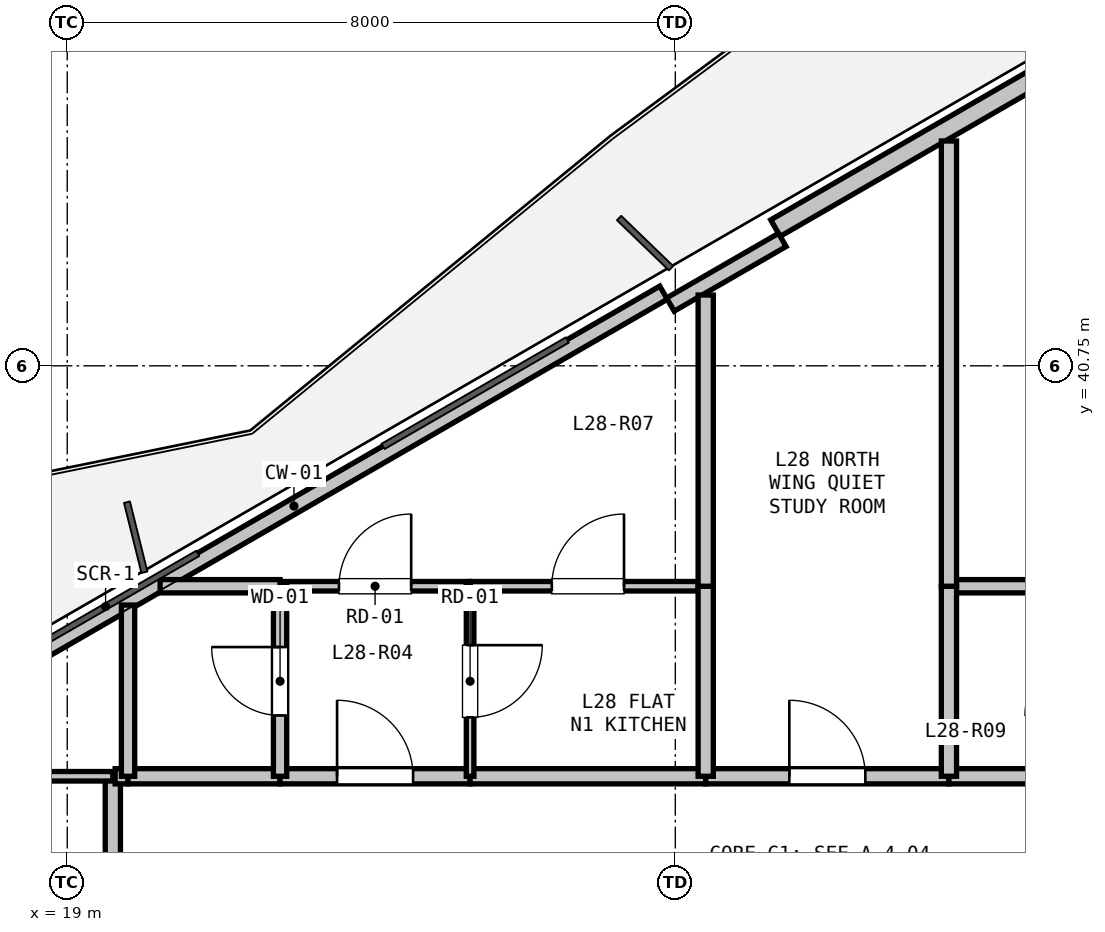
"""IFC4 building model, lengths in metres.
Left out: names, types, materials, properties, quantities, classifications, styles, units other than length and angle.
Written with IfcOpenShell. Run it as: python <this file> out.ifc"""

import sys

from ifc_helpers import new_model, si_unit, direction, frame, frame_2d, origin, place, context, subcontext, project, spatial, rectangle, extrude, element, fill, save


model = new_model("IFC4")
c1 = context("Model", 3, precision=1e-05, world=origin(), true_north=direction((0.0, 1.0)))
c2 = subcontext(c1, "Body", "Model", "MODEL_VIEW")
j1 = project(units=[si_unit("LENGTHUNIT", "METRE"), si_unit("PLANEANGLEUNIT", "RADIAN")], contexts=[c1])
p1 = place(None, origin())
s1 = spatial("IfcSite", under=j1, at=p1, CompositionType="ELEMENT")
p2 = place(p1, origin())
s2 = spatial("IfcBuilding", under=s1, at=p2, CompositionType="ELEMENT")
p3 = place(p2, frame((0.0, 0.0, 103.2)))
s3 = spatial("IfcBuildingStorey", under=s2, at=p3, CompositionType="ELEMENT", Elevation=103.2)
p4 = place(p3, frame((17.12, 36.097, 0.0), z_axis=(0.0, 0.0, 1.0), x_axis=(0.866027010039, 0.499997217876, 0.0)))
e1 = element("IfcWall", 1, at=p4, inside=s3, PredefinedType="PARAPET", context=c2, shape_type="SweptSolid", body=[
    extrude(rectangle(XDim=11.229, YDim=0.2, at=frame_2d((5.615, 0.0))), origin(), (0.0, 0.0, 1.0), 0.2),
])
p5 = place(p3, frame((28.317, 42.562, 0.0), z_axis=(0.0, 0.0, 1.0), x_axis=(0.866023023012, 0.500004123596, 0.0)))
e2 = element("IfcWall", 2, at=p5, inside=s3, PredefinedType="SOLIDWALL", context=c2, shape_type="SweptSolid", body=[
    extrude(rectangle(XDim=11.93, YDim=0.25, at=frame_2d((5.965, 0.0))), origin(), (0.0, 0.0, 1.0), 2.67),
])
p6 = place(p5, frame((6.718, 0.0, 0.9)))
e3 = element("IfcOpeningElement", 3, at=p6, cuts=e2, PredefinedType="OPENING", context=c2, shape_type="SweptSolid", body=[
    extrude(rectangle(XDim=1.2, YDim=1.4, at=frame_2d((0.6, 0.7))), frame((0.0, 0.135, 0.0), z_axis=(0.0, -1.0, 0.0), x_axis=(1.0, 0.0, 0.0)), (0.0, 0.0, 1.0), 0.27),
])
p7 = place(p3, frame((26.935, 41.556, 0.0), z_axis=(0.0, 0.0, 1.0), x_axis=(0.86605165483, 0.499954529098, 0.0)))
e4 = element("IfcWall", 4, at=p7, inside=s3, PredefinedType="PARAPET", context=c2, shape_type="SweptSolid", body=[
    extrude(rectangle(XDim=1.7, YDim=0.2, at=frame_2d((0.85, 0.0))), origin(), (0.0, 0.0, 1.0), 2.67),
])
p8 = place(p3, frame((19.6, 31.45, 0.0), z_axis=(0.0, 0.0, 1.0), x_axis=(0.0, 1.0, 0.0)))
e5 = element("IfcWall", 5, at=p8, inside=s3, PredefinedType="PARTITIONING", context=c2, shape_type="SweptSolid", body=[
    extrude(rectangle(XDim=3.9, YDim=0.2, at=frame_2d((1.95, 0.0))), origin(), (0.0, 0.0, 1.0), 2.423),
])
p9 = place(p3, frame((19.63, 35.35, 0.0), z_axis=(0.0, 0.0, 1.0), x_axis=(1.0, 0.0, 0.0)))
e6 = element("IfcWall", 6, at=p9, inside=s3, PredefinedType="PARTITIONING", context=c2, shape_type="SweptSolid", body=[
    extrude(rectangle(XDim=0.17, YDim=0.2, at=frame_2d((0.085, 0.0))), origin(), (0.0, 0.0, 1.0), 3.05),
])
p10 = place(p3, frame((19.8, 35.35, 0.0), z_axis=(0.0, 0.0, 1.0), x_axis=(1.0, 0.0, 0.0)))
e7 = element("IfcWall", 7, at=p10, inside=s3, PredefinedType="PARTITIONING", context=c2, shape_type="SweptSolid", body=[
    extrude(rectangle(XDim=2.0, YDim=0.2, at=frame_2d((1.0, 0.0))), origin(), (0.0, 0.0, 1.0), 3.05),
])
p11 = place(p3, frame((21.8, 35.35, 0.0), z_axis=(0.0, 0.0, 1.0), x_axis=(1.0, 0.0, 0.0)))
e8 = element("IfcWall", 8, at=p11, inside=s3, PredefinedType="PARTITIONING", context=c2, shape_type="SweptSolid", body=[
    extrude(rectangle(XDim=2.5, YDim=0.2, at=frame_2d((1.25, 0.0))), origin(), (0.0, 0.0, 1.0), 3.05),
])
p12 = place(p11, frame((0.75, 0.0, 0.0)))
e9 = element("IfcOpeningElement", 9, at=p12, cuts=e8, PredefinedType="OPENING", context=c2, shape_type="SweptSolid", body=[
    extrude(rectangle(XDim=1.0, YDim=2.15, at=frame_2d((0.5, 1.075))), frame((0.0, 0.11, 0.0), z_axis=(0.0, -1.0, 0.0), x_axis=(1.0, 0.0, 0.0)), (0.0, 0.0, 1.0), 0.22),
])
p13 = place(p3, frame((24.3, 35.35, 0.0), z_axis=(0.0, 0.0, 1.0), x_axis=(1.0, 0.0, 0.0)))
e10 = element("IfcWall", 10, at=p13, inside=s3, PredefinedType="PARTITIONING", context=c2, shape_type="SweptSolid", body=[
    extrude(rectangle(XDim=3.1, YDim=0.2, at=frame_2d((1.55, 0.0))), origin(), (0.0, 0.0, 1.0), 3.05),
])
p14 = place(p3, frame((27.4, 35.35, 0.0), z_axis=(0.0, 0.0, 1.0), x_axis=(1.0, 0.0, 0.0)))
e11 = element("IfcWall", 11, at=p14, inside=s3, PredefinedType="PARTITIONING", context=c2, shape_type="SweptSolid", body=[
    extrude(rectangle(XDim=3.2, YDim=0.2, at=frame_2d((1.6, 0.0))), origin(), (0.0, 0.0, 1.0), 3.05),
])
p15 = place(p14, frame((1.1, 0.0, 0.0)))
e12 = element("IfcOpeningElement", 12, at=p15, cuts=e11, PredefinedType="OPENING", context=c2, shape_type="SweptSolid", body=[
    extrude(rectangle(XDim=1.0, YDim=2.15, at=frame_2d((0.5, 1.075))), frame((0.0, 0.11, 0.0), z_axis=(0.0, -1.0, 0.0), x_axis=(1.0, 0.0, 0.0)), (0.0, 0.0, 1.0), 0.22),
])
p16 = place(p3, frame((30.6, 35.35, 0.0), z_axis=(0.0, 0.0, 1.0), x_axis=(1.0, 0.0, 0.0)))
e13 = element("IfcWall", 13, at=p16, inside=s3, PredefinedType="PARTITIONING", context=c2, shape_type="SweptSolid", body=[
    extrude(rectangle(XDim=1.9, YDim=0.2, at=frame_2d((0.95, 0.0))), origin(), (0.0, 0.0, 1.0), 3.05),
])
p17 = place(p3, frame((21.8, 37.85, 0.0), z_axis=(0.0, 0.0, 1.0), x_axis=(1.0, 0.0, 0.0)))
e14 = element("IfcWall", 14, at=p17, inside=s3, PredefinedType="PARTITIONING", context=c2, shape_type="SweptSolid", body=[
    extrude(rectangle(XDim=2.5, YDim=0.125, at=frame_2d((1.25, 0.0))), origin(), (0.0, 0.0, 1.0), 3.05),
])
p18 = place(p17, frame((0.775, 0.0, 0.0)))
e15 = element("IfcOpeningElement", 15, at=p18, cuts=e14, PredefinedType="OPENING", context=c2, shape_type="SweptSolid", body=[
    extrude(rectangle(XDim=0.95, YDim=2.1, at=frame_2d((0.475, 1.05))), frame((0.0, 0.073, 0.0), z_axis=(0.0, -1.0, 0.0), x_axis=(1.0, 0.0, 0.0)), (0.0, 0.0, 1.0), 0.145),
])
p19 = place(p3, frame((24.3, 37.85, 0.0), z_axis=(0.0, 0.0, 1.0), x_axis=(0.0, -1.0, 0.0)))
e16 = element("IfcWall", 16, at=p19, inside=s3, PredefinedType="PARTITIONING", context=c2, shape_type="SweptSolid", body=[
    extrude(rectangle(XDim=2.5, YDim=0.1, at=frame_2d((1.25, 0.0))), origin(), (0.0, 0.0, 1.0), 3.05),
])
p20 = place(p19, frame((0.775, 0.0, 0.0)))
e17 = element("IfcOpeningElement", 17, at=p20, cuts=e16, PredefinedType="OPENING", context=c2, shape_type="SweptSolid", body=[
    extrude(rectangle(XDim=0.95, YDim=2.1, at=frame_2d((0.475, 1.05))), frame((0.0, 0.06, 0.0), z_axis=(0.0, -1.0, 0.0), x_axis=(1.0, 0.0, 0.0)), (0.0, 0.0, 1.0), 0.12),
])
p21 = place(p3, frame((21.8, 35.35, 0.0), z_axis=(0.0, 0.0, 1.0), x_axis=(0.0, 1.0, 0.0)))
e18 = element("IfcWall", 18, at=p21, inside=s3, PredefinedType="PLUMBINGWALL", context=c2, shape_type="SweptSolid", body=[
    extrude(rectangle(XDim=2.5, YDim=0.175, at=frame_2d((1.25, 0.0))), origin(), (0.0, 0.0, 1.0), 3.05),
])
p22 = place(p21, frame((0.8, 0.0, 0.0)))
e19 = element("IfcOpeningElement", 19, at=p22, cuts=e18, PredefinedType="OPENING", context=c2, shape_type="SweptSolid", body=[
    extrude(rectangle(XDim=0.9, YDim=2.1, at=frame_2d((0.45, 1.05))), frame((0.0, 0.097, 0.0), z_axis=(0.0, -1.0, 0.0), x_axis=(1.0, 0.0, 0.0)), (0.0, 0.0, 1.0), 0.195),
])
p23 = place(p3, frame((19.8, 35.35, 0.0), z_axis=(0.0, 0.0, 1.0), x_axis=(0.0, 1.0, 0.0)))
e20 = element("IfcWall", 20, at=p23, inside=s3, PredefinedType="PLUMBINGWALL", context=c2, shape_type="SweptSolid", body=[
    extrude(rectangle(XDim=2.252, YDim=0.175, at=frame_2d((1.126, 0.0))), origin(), (0.0, 0.0, 1.0), 2.365),
])
p24 = place(p3, frame((20.222, 37.85, 0.0), z_axis=(0.0, 0.0, 1.0), x_axis=(1.0, 0.0, 0.0)))
e21 = element("IfcWall", 21, at=p24, inside=s3, PredefinedType="PLUMBINGWALL", context=c2, shape_type="SweptSolid", body=[
    extrude(rectangle(XDim=1.578, YDim=0.175, at=frame_2d((0.789, 0.0))), origin(), (0.0, 0.0, 1.0), 2.365),
])
p25 = place(p3, frame((24.3, 37.85, 0.0), z_axis=(0.0, 0.0, 1.0), x_axis=(1.0, 0.0, 0.0)))
e22 = element("IfcWall", 22, at=p25, inside=s3, PredefinedType="PARTITIONING", context=c2, shape_type="SweptSolid", body=[
    extrude(rectangle(XDim=3.1, YDim=0.125, at=frame_2d((1.55, 0.0))), origin(), (0.0, 0.0, 1.0), 3.05),
])
p26 = place(p25, frame((1.075, 0.0, 0.0)))
e23 = element("IfcOpeningElement", 23, at=p26, cuts=e22, PredefinedType="OPENING", context=c2, shape_type="SweptSolid", body=[
    extrude(rectangle(XDim=0.95, YDim=2.1, at=frame_2d((0.475, 1.05))), frame((0.0, 0.073, 0.0), z_axis=(0.0, -1.0, 0.0), x_axis=(1.0, 0.0, 0.0)), (0.0, 0.0, 1.0), 0.145),
])
p27 = place(p3, frame((27.4, 37.85, 0.0), z_axis=(0.0, 0.0, 1.0), x_axis=(0.0, -1.0, 0.0)))
e24 = element("IfcWall", 24, at=p27, inside=s3, PredefinedType="PARTITIONING", context=c2, shape_type="SweptSolid", body=[
    extrude(rectangle(XDim=2.5, YDim=0.2, at=frame_2d((1.25, 0.0))), origin(), (0.0, 0.0, 1.0), 3.05),
])
p28 = place(p3, frame((30.6, 37.85, 0.0), z_axis=(0.0, 0.0, 1.0), x_axis=(1.0, 0.0, 0.0)))
e25 = element("IfcWall", 25, at=p28, inside=s3, PredefinedType="PLUMBINGWALL", context=c2, shape_type="SweptSolid", body=[
    extrude(rectangle(XDim=1.9, YDim=0.175, at=frame_2d((0.95, 0.0))), origin(), (0.0, 0.0, 1.0), 3.05),
])
p29 = place(p3, frame((30.6, 35.35, 0.0), z_axis=(0.0, 0.0, 1.0), x_axis=(0.0, 1.0, 0.0)))
e26 = element("IfcWall", 26, at=p29, inside=s3, PredefinedType="PARTITIONING", context=c2, shape_type="SweptSolid", body=[
    extrude(rectangle(XDim=2.5, YDim=0.2, at=frame_2d((1.25, 0.0))), origin(), (0.0, 0.0, 1.0), 3.05),
])
p30 = place(p3, frame((17.15, 35.35, 0.0), z_axis=(0.0, 0.0, 1.0), x_axis=(1.0, 0.0, 0.0)))
e27 = element("IfcWall", 27, at=p30, inside=s3, PredefinedType="PARTITIONING", context=c2, shape_type="SweptSolid", body=[
    extrude(rectangle(XDim=2.45, YDim=0.125, at=frame_2d((1.225, 0.0))), origin(), (0.0, 0.0, 1.0), 2.365),
])
p31 = place(p3, frame((30.6, 43.708, 0.0), z_axis=(0.0, 0.0, 1.0), x_axis=(0.0, -1.0, 0.0)))
e28 = element("IfcWall", 28, at=p31, inside=s3, PredefinedType="PARTITIONING", context=c2, shape_type="SweptSolid", body=[
    extrude(rectangle(XDim=5.857, YDim=0.2, at=frame_2d((2.929, 0.0))), origin(), (0.0, 0.0, 1.0), 2.365),
])
p32 = place(p3, frame((27.4, 37.85, 0.0), z_axis=(0.0, 0.0, 1.0), x_axis=(0.0, 1.0, 0.0)))
e29 = element("IfcWall", 29, at=p32, inside=s3, PredefinedType="PARTITIONING", context=c2, shape_type="SweptSolid", body=[
    extrude(rectangle(XDim=3.831, YDim=0.2, at=frame_2d((1.916, 0.0))), origin(), (0.0, 0.0, 1.0), 2.365),
])
p33 = place(p12, origin())
e30 = element("IfcDoor", 30, at=p33, inside=s3, OperationType="SINGLE_SWING_LEFT", PredefinedType="DOOR", context=c2, shape_type="SweptSolid", body=[
    extrude(rectangle(XDim=1.0, YDim=2.15, at=frame_2d((0.5, 1.075))), frame((0.0, 0.025, 0.0), z_axis=(0.0, -1.0, 0.0), x_axis=(1.0, 0.0, 0.0)), (0.0, 0.0, 1.0), 0.05),
])
fill(e9, e30)
p34 = place(p15, origin())
e31 = element("IfcDoor", 31, at=p34, inside=s3, OperationType="SINGLE_SWING_LEFT", PredefinedType="DOOR", context=c2, shape_type="SweptSolid", body=[
    extrude(rectangle(XDim=1.0, YDim=2.15, at=frame_2d((0.5, 1.075))), frame((0.0, 0.025, 0.0), z_axis=(0.0, -1.0, 0.0), x_axis=(1.0, 0.0, 0.0)), (0.0, 0.0, 1.0), 0.05),
])
fill(e12, e31)
p35 = place(p22, origin())
e32 = element("IfcDoor", 32, at=p35, inside=s3, OperationType="SINGLE_SWING_RIGHT", PredefinedType="DOOR", context=c2, shape_type="SweptSolid", body=[
    extrude(rectangle(XDim=0.9, YDim=2.1, at=frame_2d((0.45, 1.05))), frame((0.0, 0.025, 0.0), z_axis=(0.0, -1.0, 0.0), x_axis=(1.0, 0.0, 0.0)), (0.0, 0.0, 1.0), 0.05),
])
fill(e19, e32)
p36 = place(p20, origin())
e33 = element("IfcDoor", 33, at=p36, inside=s3, OperationType="SINGLE_SWING_LEFT", PredefinedType="DOOR", context=c2, shape_type="SweptSolid", body=[
    extrude(rectangle(XDim=0.95, YDim=2.1, at=frame_2d((0.475, 1.05))), frame((0.0, 0.025, 0.0), z_axis=(0.0, -1.0, 0.0), x_axis=(1.0, 0.0, 0.0)), (0.0, 0.0, 1.0), 0.05),
])
fill(e17, e33)
p37 = place(p18, origin())
e34 = element("IfcDoor", 34, at=p37, inside=s3, OperationType="SINGLE_SWING_RIGHT", PredefinedType="DOOR", context=c2, shape_type="SweptSolid", body=[
    extrude(rectangle(XDim=0.95, YDim=2.1, at=frame_2d((0.475, 1.05))), frame((0.0, 0.025, 0.0), z_axis=(0.0, -1.0, 0.0), x_axis=(1.0, 0.0, 0.0)), (0.0, 0.0, 1.0), 0.05),
])
fill(e15, e34)
p38 = place(p26, origin())
e35 = element("IfcDoor", 35, at=p38, inside=s3, OperationType="SINGLE_SWING_RIGHT", PredefinedType="DOOR", context=c2, shape_type="SweptSolid", body=[
    extrude(rectangle(XDim=0.95, YDim=2.1, at=frame_2d((0.475, 1.05))), frame((0.0, 0.025, 0.0), z_axis=(0.0, -1.0, 0.0), x_axis=(1.0, 0.0, 0.0)), (0.0, 0.0, 1.0), 0.05),
])
fill(e23, e35)
save(model, sys.argv[1])
